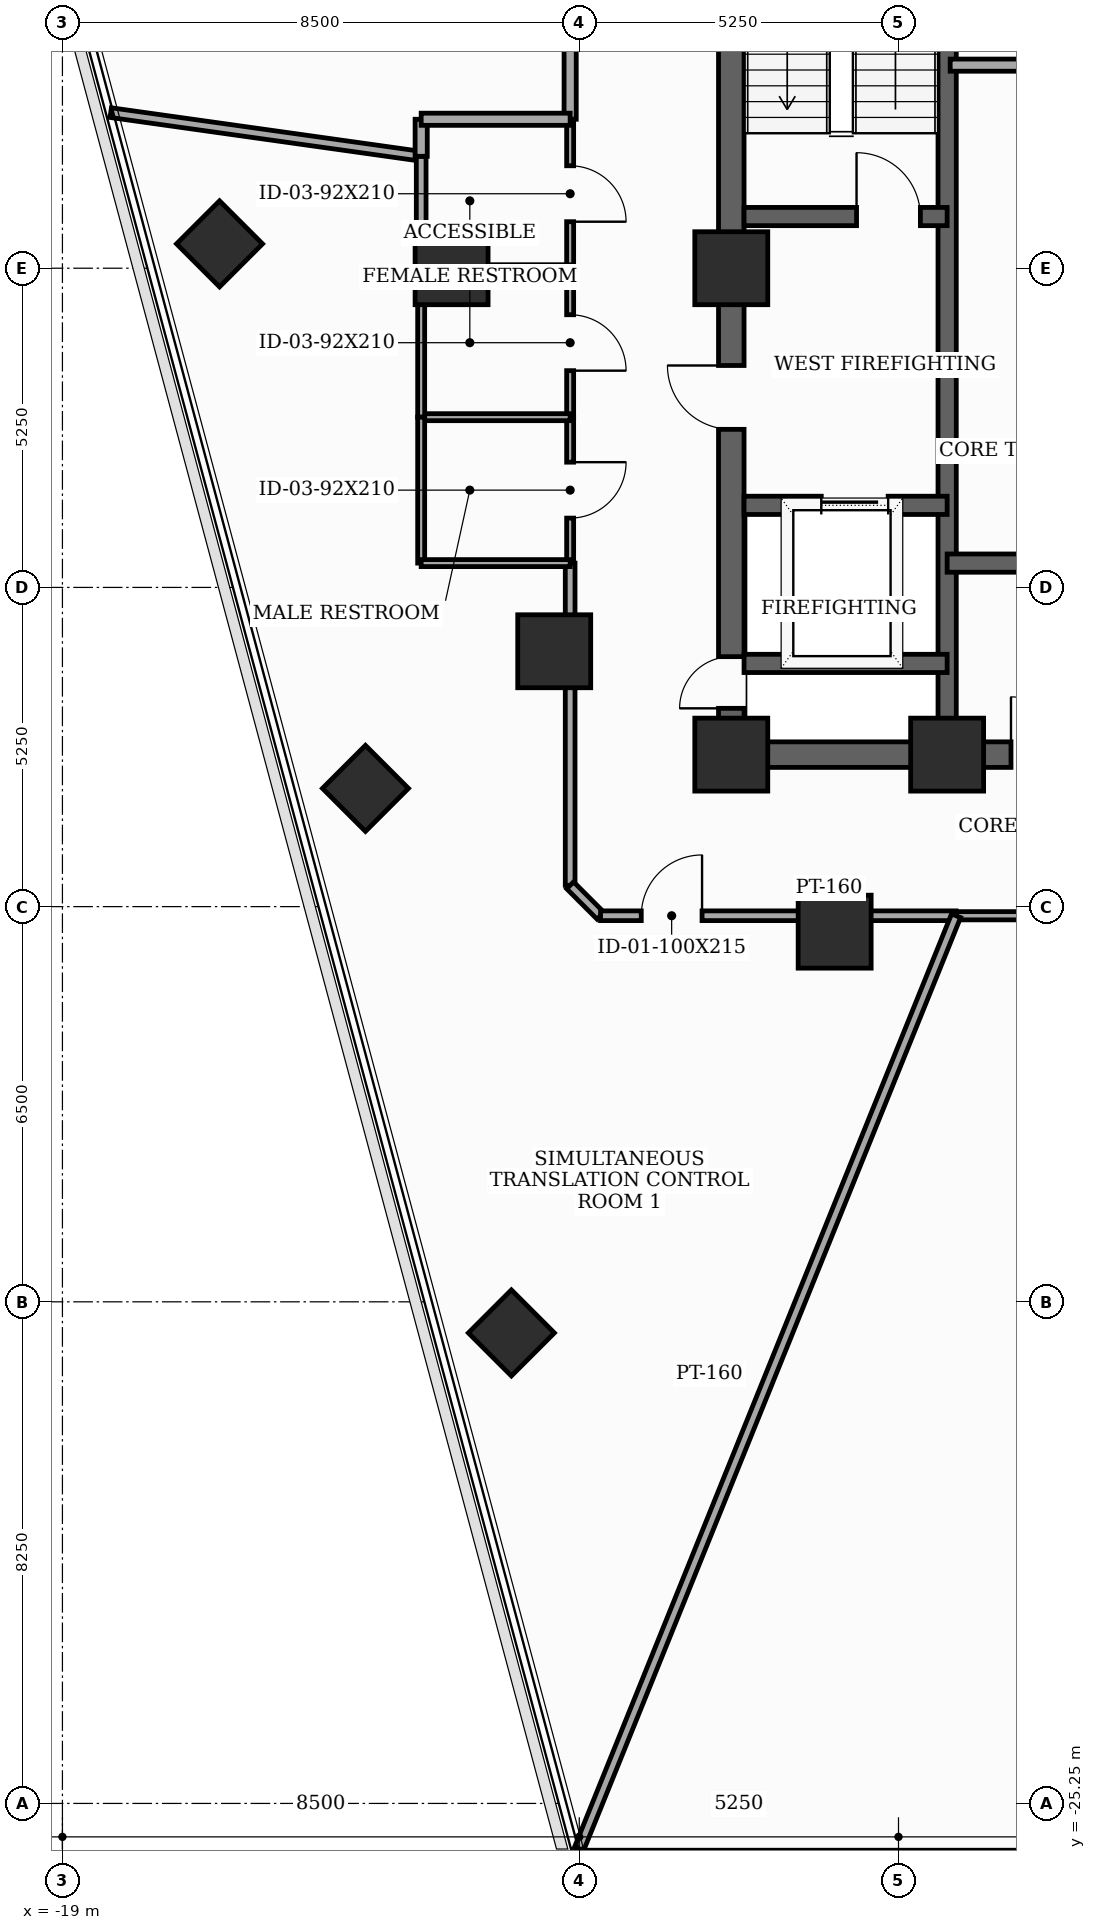
"""IFC4 building model, lengths in metres.
Left out: names, types, materials, properties, quantities, classifications, styles, units other than length and angle.
Written with IfcOpenShell. Run it as: python <this file> out.ifc"""

import sys

from ifc_helpers import new_model, si_unit, direction, frame, frame_2d, origin, origin_2d, place, context, subcontext, project, spatial, rectangle, extrude, element, fill, save


model = new_model("IFC4")
c1 = context("Model", 3, precision=1e-05, world=origin(), true_north=direction((0.0, 1.0)))
c2 = subcontext(c1, "Body", "Model", "MODEL_VIEW")
j1 = project(units=[si_unit("LENGTHUNIT", "METRE"), si_unit("PLANEANGLEUNIT", "RADIAN")], contexts=[c1])
p1 = place(None, origin())
s1 = spatial("IfcSite", under=j1, at=p1, CompositionType="ELEMENT")
p2 = place(p1, origin())
s2 = spatial("IfcBuilding", under=s1, at=p2, CompositionType="ELEMENT")
p3 = place(p2, frame((0.0, 0.0, 202.7)))
s3 = spatial("IfcBuildingStorey", under=s2, at=p3, CompositionType="ELEMENT", Elevation=202.7)
for number, where, z_axis, x_axis in (
    (1, (-8.0, -8.0, 0.0), (0.0, 0.0, 1.0), (1.0, 0.0, 0.0)),
    (2, (-4.45, -8.0, 0.0), (0.0, 0.0, 1.0), (1.0, 0.0, 0.0)),
    (3, (-8.0, 0.0, 0.0), (0.0, 0.0, 1.0), (1.0, 0.0, 0.0)),
    (4, (-12.6, 0.0, 0.0), (0.0, 0.0, 1.0), (1.0, 0.0, 0.0)),
    (5, (-10.912, -6.3, 0.0), (0.0, 0.0, 1.0), (1.0, 0.0, 0.0)),
    (6, (-6.3, -10.912, 0.0), (0.0, 0.0, 1.0), (1.0, 0.0, 0.0)),
):
    element("IfcColumn", number, at=place(p3, frame(where, z_axis=z_axis, x_axis=x_axis)), inside=s3, PredefinedType="COLUMN", context=c2, shape_type="SweptSolid", body=[
        extrude(rectangle(XDim=1.2, YDim=1.2, at=origin_2d()), origin(), (0.0, 0.0, 1.0), 3.7),
    ])
for number, where, z_axis, x_axis in (
    (7, (-16.416, 0.401, 0.0), (0.0, 0.0, 1.0), (0.707, 0.707, 0.0)),
    (8, (-14.016, -8.555, 0.0), (0.0, 0.0, 1.0), (0.707, 0.707, 0.0)),
    (9, (-11.616, -17.511, 0.0), (0.0, 0.0, 1.0), (0.707, 0.707, 0.0)),
):
    element("IfcColumn", number, at=place(p3, frame(where, z_axis=z_axis, x_axis=x_axis)), inside=s3, PredefinedType="COLUMN", context=c2, shape_type="SweptSolid", body=[
        extrude(rectangle(XDim=1.0, YDim=1.0, at=origin_2d()), origin(), (0.0, 0.0, 1.0), 3.7),
    ])
p4 = place(p3, frame((-8.0, -8.0, 0.0), z_axis=(0.0, 0.0, 1.0), x_axis=(0.0, 1.0, 0.0)))
e10 = element("IfcWall", 10, at=p4, inside=s3, PredefinedType="SHEAR", context=c2, shape_type="SweptSolid", body=[
    extrude(rectangle(XDim=16.0, YDim=0.42, at=frame_2d((8.0, 0.0))), origin(), (0.0, 0.0, 1.0), 3.5),
])
p5 = place(p4, frame((0.761, 0.0, 0.0)))
e11 = element("IfcOpeningElement", 11, at=p5, cuts=e10, PredefinedType="OPENING", context=c2, shape_type="SweptSolid", body=[
    extrude(rectangle(XDim=0.85, YDim=2.02, at=frame_2d((0.425, 1.01))), frame((0.0, 0.22, 0.0), z_axis=(0.0, -1.0, 0.0), x_axis=(1.0, 0.0, 0.0)), (0.0, 0.0, 1.0), 0.44),
])
p6 = place(p4, frame((5.35, 0.0, 0.0)))
e12 = element("IfcOpeningElement", 12, at=p6, cuts=e10, PredefinedType="OPENING", context=c2, shape_type="SweptSolid", body=[
    extrude(rectangle(XDim=1.05, YDim=2.15, at=frame_2d((0.525, 1.075))), frame((0.0, 0.22, 0.0), z_axis=(0.0, -1.0, 0.0), x_axis=(1.0, 0.0, 0.0)), (0.0, 0.0, 1.0), 0.44),
])
p7 = place(p3, frame((-8.0, -8.0, 0.0), z_axis=(0.0, 0.0, 1.0), x_axis=(1.0, 0.0, 0.0)))
e13 = element("IfcWall", 13, at=p7, inside=s3, PredefinedType="SHEAR", context=c2, shape_type="SweptSolid", body=[
    extrude(rectangle(XDim=16.0, YDim=0.42, at=frame_2d((8.0, 0.0))), origin(), (0.0, 0.0, 1.0), 3.5),
])
p8 = place(p7, frame((4.6, 0.0, 0.0)))
e14 = element("IfcOpeningElement", 14, at=p8, cuts=e13, PredefinedType="OPENING", context=c2, shape_type="SweptSolid", body=[
    extrude(rectangle(XDim=0.95, YDim=2.1, at=frame_2d((0.475, 1.05))), frame((0.0, 0.22, 0.0), z_axis=(0.0, -1.0, 0.0), x_axis=(1.0, 0.0, 0.0)), (0.0, 0.0, 1.0), 0.44),
])
p9 = place(p7, frame((7.52, 0.0, 0.0)))
e15 = element("IfcOpeningElement", 15, at=p9, cuts=e13, PredefinedType="OPENING", context=c2, shape_type="SweptSolid", body=[
    extrude(rectangle(XDim=0.95, YDim=2.1, at=frame_2d((0.475, 1.05))), frame((0.0, 0.22, 0.0), z_axis=(0.0, -1.0, 0.0), x_axis=(1.0, 0.0, 0.0)), (0.0, 0.0, 1.0), 0.44),
])
p10 = place(p7, frame((10.45, 0.0, 0.0)))
e16 = element("IfcOpeningElement", 16, at=p10, cuts=e13, PredefinedType="OPENING", context=c2, shape_type="SweptSolid", body=[
    extrude(rectangle(XDim=0.95, YDim=2.1, at=frame_2d((0.475, 1.05))), frame((0.0, 0.22, 0.0), z_axis=(0.0, -1.0, 0.0), x_axis=(1.0, 0.0, 0.0)), (0.0, 0.0, 1.0), 0.44),
])
p11 = place(p3, frame((-4.45, -7.79, 0.0), z_axis=(0.0, 0.0, 1.0), x_axis=(0.0, 1.0, 0.0)))
e17 = element("IfcWall", 17, at=p11, inside=s3, PredefinedType="SHEAR", context=c2, shape_type="SweptSolid", body=[
    extrude(rectangle(XDim=15.58, YDim=0.3, at=frame_2d((7.79, 0.0))), origin(), (0.0, 0.0, 1.0), 3.5),
])
p12 = place(p3, frame((-7.79, 0.85, 0.0), z_axis=(0.0, 0.0, 1.0), x_axis=(1.0, 0.0, 0.0)))
e18 = element("IfcWall", 18, at=p12, inside=s3, PredefinedType="SHEAR", context=c2, shape_type="SweptSolid", body=[
    extrude(rectangle(XDim=3.34, YDim=0.3, at=frame_2d((1.67, 0.0))), origin(), (0.0, 0.0, 1.0), 3.5),
])
p13 = place(p12, frame((1.85, 0.0, 0.0)))
e19 = element("IfcOpeningElement", 19, at=p13, cuts=e18, PredefinedType="OPENING", context=c2, shape_type="SweptSolid", body=[
    extrude(rectangle(XDim=1.05, YDim=2.15, at=frame_2d((0.525, 1.075))), frame((0.0, 0.16, 0.0), z_axis=(0.0, -1.0, 0.0), x_axis=(1.0, 0.0, 0.0)), (0.0, 0.0, 1.0), 0.32),
])
p14 = place(p3, frame((-7.79, -3.9, 0.0), z_axis=(0.0, 0.0, 1.0), x_axis=(1.0, 0.0, 0.0)))
e20 = element("IfcWall", 20, at=p14, inside=s3, PredefinedType="SHEAR", context=c2, shape_type="SweptSolid", body=[
    extrude(rectangle(XDim=3.34, YDim=0.3, at=frame_2d((1.67, 0.0))), origin(), (0.0, 0.0, 1.0), 3.5),
])
p15 = place(p14, frame((1.27, 0.0, 0.0)))
e21 = element("IfcOpeningElement", 21, at=p15, cuts=e20, PredefinedType="OPENING", context=c2, shape_type="SweptSolid", body=[
    extrude(rectangle(XDim=1.1, YDim=2.1, at=frame_2d((0.55, 1.05))), frame((0.0, 0.16, 0.0), z_axis=(0.0, -1.0, 0.0), x_axis=(1.0, 0.0, 0.0)), (0.0, 0.0, 1.0), 0.32),
])
p16 = place(p3, frame((-7.79, -6.5, 0.0), z_axis=(0.0, 0.0, 1.0), x_axis=(1.0, 0.0, 0.0)))
e22 = element("IfcWall", 22, at=p16, inside=s3, PredefinedType="SHEAR", context=c2, shape_type="SweptSolid", body=[
    extrude(rectangle(XDim=3.34, YDim=0.3, at=frame_2d((1.67, 0.0))), origin(), (0.0, 0.0, 1.0), 3.5),
])
p17 = place(p3, frame((-4.45, -4.85, 0.0), z_axis=(0.0, 0.0, 1.0), x_axis=(1.0, 0.0, 0.0)))
e23 = element("IfcWall", 23, at=p17, inside=s3, PredefinedType="SHEAR", context=c2, shape_type="SweptSolid", body=[
    extrude(rectangle(XDim=8.9, YDim=0.3, at=frame_2d((4.45, 0.0))), origin(), (0.0, 0.0, 1.0), 3.5),
])
p18 = place(p3, frame((-4.4, 3.34, 0.0), z_axis=(0.0, 0.0, 1.0), x_axis=(1.0, 0.0, 0.0)))
e24 = element("IfcWall", 24, at=p18, inside=s3, PredefinedType="SOLIDWALL", context=c2, shape_type="SweptSolid", body=[
    extrude(rectangle(XDim=2.68, YDim=0.2, at=frame_2d((1.34, 0.0))), origin(), (0.0, 0.0, 1.0), 3.5),
])
p19 = place(p3, frame((-10.65, 0.0, 0.0), z_axis=(0.0, 0.0, 1.0), x_axis=(0.0, -1.0, 0.0)))
e25 = element("IfcWall", 25, at=p19, inside=s3, PredefinedType="PARTITIONING", context=c2, shape_type="SweptSolid", body=[
    extrude(rectangle(XDim=2.45, YDim=0.115, at=frame_2d((1.225, 0.0))), origin(), (0.0, 0.0, 1.0), 2.885),
])
p20 = place(p19, frame((0.765, 0.0, 0.0)))
e26 = element("IfcOpeningElement", 26, at=p20, cuts=e25, PredefinedType="OPENING", context=c2, shape_type="SweptSolid", body=[
    extrude(rectangle(XDim=0.92, YDim=2.1, at=frame_2d((0.46, 1.05))), frame((0.0, 0.067, 0.0), z_axis=(0.0, -1.0, 0.0), x_axis=(1.0, 0.0, 0.0)), (0.0, 0.0, 1.0), 0.135),
])
p21 = place(p3, frame((-10.65, -2.45, 0.0), z_axis=(0.0, 0.0, 1.0), x_axis=(0.0, -1.0, 0.0)))
e27 = element("IfcWall", 27, at=p21, inside=s3, PredefinedType="PARTITIONING", context=c2, shape_type="SweptSolid", body=[
    extrude(rectangle(XDim=2.4, YDim=0.115, at=frame_2d((1.2, 0.0))), origin(), (0.0, 0.0, 1.0), 3.5),
])
p22 = place(p21, frame((0.74, 0.0, 0.0)))
e28 = element("IfcOpeningElement", 28, at=p22, cuts=e27, PredefinedType="OPENING", context=c2, shape_type="SweptSolid", body=[
    extrude(rectangle(XDim=0.92, YDim=2.1, at=frame_2d((0.46, 1.05))), frame((0.0, 0.067, 0.0), z_axis=(0.0, -1.0, 0.0), x_axis=(1.0, 0.0, 0.0)), (0.0, 0.0, 1.0), 0.135),
])
p23 = place(p3, frame((-10.65, -4.85, 0.0), z_axis=(0.0, 0.0, 1.0), x_axis=(0.0, -1.0, 0.0)))
e29 = element("IfcWall", 29, at=p23, inside=s3, PredefinedType="PARTITIONING", context=c2, shape_type="SweptSolid", body=[
    extrude(rectangle(XDim=5.3, YDim=0.16, at=frame_2d((2.65, 0.0))), origin(), (0.0, 0.0, 1.0), 2.885),
])
p24 = place(p3, frame((-10.65, -10.15, 0.0), z_axis=(0.0, 0.0, 1.0), x_axis=(0.707106781187, -0.707106781187, 0.0)))
e30 = element("IfcWall", 30, at=p24, inside=s3, PredefinedType="PARTITIONING", context=c2, shape_type="SweptSolid", body=[
    extrude(rectangle(XDim=0.707, YDim=0.16, at=frame_2d((0.354, 0.0))), origin(), (0.0, 0.0, 1.0), 3.5),
])
p25 = place(p3, frame((-10.15, -10.65, 0.0), z_axis=(0.0, 0.0, 1.0), x_axis=(1.0, 0.0, 0.0)))
e31 = element("IfcWall", 31, at=p25, inside=s3, PredefinedType="PARTITIONING", context=c2, shape_type="SweptSolid", body=[
    extrude(rectangle(XDim=5.847, YDim=0.16, at=frame_2d((2.923, 0.0))), origin(), (0.0, 0.0, 1.0), 2.885),
])
p26 = place(p25, frame((0.669, 0.0, 0.0)))
e32 = element("IfcOpeningElement", 32, at=p26, cuts=e31, PredefinedType="OPENING", context=c2, shape_type="SweptSolid", body=[
    extrude(rectangle(XDim=1.0, YDim=2.15, at=frame_2d((0.5, 1.075))), frame((0.0, 0.09, 0.0), z_axis=(0.0, -1.0, 0.0), x_axis=(1.0, 0.0, 0.0)), (0.0, 0.0, 1.0), 0.18),
])
p27 = place(p3, frame((-4.303, -10.65, 0.0), z_axis=(0.0, 0.0, 1.0), x_axis=(1.0, 0.0, 0.0)))
e33 = element("IfcWall", 33, at=p27, inside=s3, PredefinedType="PARTITIONING", context=c2, shape_type="SweptSolid", body=[
    extrude(rectangle(XDim=14.453, YDim=0.135, at=frame_2d((7.227, 0.0))), origin(), (0.0, 0.0, 1.0), 2.885),
])
p28 = place(p27, frame((6.751, 0.0, 0.0)))
e34 = element("IfcOpeningElement", 34, at=p28, cuts=e33, PredefinedType="OPENING", context=c2, shape_type="SweptSolid", body=[
    extrude(rectangle(XDim=0.95, YDim=2.1, at=frame_2d((0.475, 1.05))), frame((0.0, 0.077, 0.0), z_axis=(0.0, -1.0, 0.0), x_axis=(1.0, 0.0, 0.0)), (0.0, 0.0, 1.0), 0.155),
])
p29 = place(p3, frame((-10.65, 10.15, 0.0), z_axis=(0.0, 0.0, 1.0), x_axis=(0.0, -1.0, 0.0)))
e35 = element("IfcWall", 35, at=p29, inside=s3, PredefinedType="SOLIDWALL", context=c2, shape_type="SweptSolid", body=[
    extrude(rectangle(XDim=7.7, YDim=0.2, at=frame_2d((3.85, 0.0))), origin(), (0.0, 0.0, 1.0), 2.885),
])
p30 = place(p3, frame((-10.65, 2.45, 0.0), z_axis=(0.0, 0.0, 1.0), x_axis=(0.0, -1.0, 0.0)))
e36 = element("IfcWall", 36, at=p30, inside=s3, PredefinedType="PARTITIONING", context=c2, shape_type="SweptSolid", body=[
    extrude(rectangle(XDim=2.45, YDim=0.115, at=frame_2d((1.225, 0.0))), origin(), (0.0, 0.0, 1.0), 2.885),
])
p31 = place(p30, frame((0.765, 0.0, 0.0)))
e37 = element("IfcOpeningElement", 37, at=p31, cuts=e36, PredefinedType="OPENING", context=c2, shape_type="SweptSolid", body=[
    extrude(rectangle(XDim=0.92, YDim=2.1, at=frame_2d((0.46, 1.05))), frame((0.0, 0.067, 0.0), z_axis=(0.0, -1.0, 0.0), x_axis=(1.0, 0.0, 0.0)), (0.0, 0.0, 1.0), 0.135),
])
p32 = place(p3, frame((-13.1, -2.45, 0.0), z_axis=(0.0, 0.0, 1.0), x_axis=(1.0, 0.0, 0.0)))
e38 = element("IfcWall", 38, at=p32, inside=s3, PredefinedType="PARTITIONING", context=c2, shape_type="SweptSolid", body=[
    extrude(rectangle(XDim=2.45, YDim=0.115, at=frame_2d((1.225, 0.0))), origin(), (0.0, 0.0, 1.0), 2.885),
])
p33 = place(p3, frame((-13.1, 0.0, 0.0), z_axis=(0.0, 0.0, 1.0), x_axis=(0.0, -1.0, 0.0)))
e39 = element("IfcWall", 39, at=p33, inside=s3, PredefinedType="PARTITIONING", context=c2, shape_type="SweptSolid", body=[
    extrude(rectangle(XDim=2.45, YDim=0.115, at=frame_2d((1.225, 0.0))), origin(), (0.0, 0.0, 1.0), 2.975),
])
p34 = place(p3, frame((-10.65, 0.0, 0.0), z_axis=(0.0, 0.0, 1.0), x_axis=(-1.0, 0.0, 0.0)))
e40 = element("IfcWall", 40, at=p34, inside=s3, PredefinedType="PARTITIONING", context=c2, shape_type="SweptSolid", body=[
    extrude(rectangle(XDim=2.45, YDim=0.115, at=frame_2d((1.225, 0.0))), origin(), (0.0, 0.0, 1.0), 2.885),
])
p35 = place(p3, frame((-13.1, -2.45, 0.0), z_axis=(0.0, 0.0, 1.0), x_axis=(0.0, -1.0, 0.0)))
e41 = element("IfcWall", 41, at=p35, inside=s3, PredefinedType="PARTITIONING", context=c2, shape_type="SweptSolid", body=[
    extrude(rectangle(XDim=2.4, YDim=0.115, at=frame_2d((1.2, 0.0))), origin(), (0.0, 0.0, 1.0), 3.5),
])
p36 = place(p3, frame((-13.1, -4.85, 0.0), z_axis=(0.0, 0.0, 1.0), x_axis=(1.0, 0.0, 0.0)))
e42 = element("IfcWall", 42, at=p36, inside=s3, PredefinedType="PARTITIONING", context=c2, shape_type="SweptSolid", body=[
    extrude(rectangle(XDim=2.45, YDim=0.115, at=frame_2d((1.225, 0.0))), origin(), (0.0, 0.0, 1.0), 2.885),
])
p37 = place(p3, frame((-10.534, -26.073, 0.0), z_axis=(0.0, 0.0, 1.0), x_axis=(0.374584629334, 0.927192728329, 0.0)))
e43 = element("IfcWall", 43, at=p37, inside=s3, PredefinedType="PARTITIONING", context=c2, shape_type="SweptSolid", body=[
    extrude(rectangle(XDim=16.634, YDim=0.16, at=frame_2d((8.317, 0.0))), origin(), (0.0, 0.0, 1.0), 2.885),
])
p38 = place(p3, frame((-13.1, 1.841, 0.0), z_axis=(0.0, 0.0, 1.0), x_axis=(-0.990254946284, 0.139266440179, 0.0)))
e44 = element("IfcWall", 44, at=p38, inside=s3, PredefinedType="PARTITIONING", context=c2, shape_type="SweptSolid", body=[
    extrude(rectangle(XDim=5.156, YDim=0.16, at=frame_2d((2.578, 0.0))), origin(), (0.0, 0.0, 1.0), 2.975),
])
p39 = place(p3, frame((-13.1, 0.0, 0.0), z_axis=(0.0, 0.0, 1.0), x_axis=(0.0, 1.0, 0.0)))
e45 = element("IfcWall", 45, at=p39, inside=s3, PredefinedType="PARTITIONING", context=c2, shape_type="SweptSolid", body=[
    extrude(rectangle(XDim=1.841, YDim=0.16, at=frame_2d((0.92, 0.0))), origin(), (0.0, 0.0, 1.0), 2.975),
])
p40 = place(p3, frame((-13.1, 1.841, 0.0), z_axis=(0.0, 0.0, 1.0), x_axis=(0.0, 1.0, 0.0)))
e46 = element("IfcWall", 46, at=p40, inside=s3, PredefinedType="SOLIDWALL", context=c2, shape_type="SweptSolid", body=[
    extrude(rectangle(XDim=0.609, YDim=0.2, at=frame_2d((0.304, 0.0))), origin(), (0.0, 0.0, 1.0), 3.5),
])
p41 = place(p3, frame((-13.1, 2.45, 0.0), z_axis=(0.0, 0.0, 1.0), x_axis=(1.0, 0.0, 0.0)))
e47 = element("IfcWall", 47, at=p41, inside=s3, PredefinedType="SOLIDWALL", context=c2, shape_type="SweptSolid", body=[
    extrude(rectangle(XDim=2.45, YDim=0.2, at=frame_2d((1.225, 0.0))), origin(), (0.0, 0.0, 1.0), 2.885),
])
p42 = place(p5, origin())
e48 = element("IfcDoor", 48, at=p42, inside=s3, OperationType="SINGLE_SWING_LEFT", PredefinedType="TRAPDOOR", context=c2, shape_type="SweptSolid", body=[
    extrude(rectangle(XDim=0.85, YDim=2.02, at=frame_2d((0.425, 1.01))), frame((0.0, 0.025, 0.0), z_axis=(0.0, -1.0, 0.0), x_axis=(1.0, 0.0, 0.0)), (0.0, 0.0, 1.0), 0.05),
])
fill(e11, e48)
p43 = place(p6, origin())
e49 = element("IfcDoor", 49, at=p43, inside=s3, OperationType="SINGLE_SWING_RIGHT", PredefinedType="DOOR", context=c2, shape_type="SweptSolid", body=[
    extrude(rectangle(XDim=1.05, YDim=2.15, at=frame_2d((0.525, 1.075))), frame((0.0, 0.025, 0.0), z_axis=(0.0, -1.0, 0.0), x_axis=(1.0, 0.0, 0.0)), (0.0, 0.0, 1.0), 0.05),
])
fill(e12, e49)
p44 = place(p8, origin())
e50 = element("IfcDoor", 50, at=p44, inside=s3, OperationType="SINGLE_SWING_LEFT", PredefinedType="DOOR", context=c2, shape_type="SweptSolid", body=[
    extrude(rectangle(XDim=0.95, YDim=2.1, at=frame_2d((0.475, 1.05))), frame((0.0, 0.025, 0.0), z_axis=(0.0, -1.0, 0.0), x_axis=(1.0, 0.0, 0.0)), (0.0, 0.0, 1.0), 0.05),
])
fill(e14, e50)
p45 = place(p13, origin())
e51 = element("IfcDoor", 51, at=p45, inside=s3, OperationType="SINGLE_SWING_LEFT", PredefinedType="DOOR", context=c2, shape_type="SweptSolid", body=[
    extrude(rectangle(XDim=1.05, YDim=2.15, at=frame_2d((0.525, 1.075))), frame((0.0, 0.025, 0.0), z_axis=(0.0, -1.0, 0.0), x_axis=(1.0, 0.0, 0.0)), (0.0, 0.0, 1.0), 0.05),
])
fill(e19, e51)
p46 = place(p15, origin())
e52 = element("IfcDoor", 52, at=p46, inside=s3, OperationType="SLIDING_TO_LEFT", PredefinedType="DOOR", context=c2, shape_type="SweptSolid", body=[
    extrude(rectangle(XDim=1.1, YDim=2.1, at=frame_2d((0.55, 1.05))), frame((0.0, 0.025, 0.0), z_axis=(0.0, -1.0, 0.0), x_axis=(1.0, 0.0, 0.0)), (0.0, 0.0, 1.0), 0.05),
])
fill(e21, e52)
p47 = place(p20, origin())
e53 = element("IfcDoor", 53, at=p47, inside=s3, OperationType="SINGLE_SWING_RIGHT", PredefinedType="DOOR", context=c2, shape_type="SweptSolid", body=[
    extrude(rectangle(XDim=0.92, YDim=2.1, at=frame_2d((0.46, 1.05))), frame((0.0, 0.025, 0.0), z_axis=(0.0, -1.0, 0.0), x_axis=(1.0, 0.0, 0.0)), (0.0, 0.0, 1.0), 0.05),
])
fill(e26, e53)
p48 = place(p22, origin())
e54 = element("IfcDoor", 54, at=p48, inside=s3, OperationType="SINGLE_SWING_LEFT", PredefinedType="DOOR", context=c2, shape_type="SweptSolid", body=[
    extrude(rectangle(XDim=0.92, YDim=2.1, at=frame_2d((0.46, 1.05))), frame((0.0, 0.025, 0.0), z_axis=(0.0, -1.0, 0.0), x_axis=(1.0, 0.0, 0.0)), (0.0, 0.0, 1.0), 0.05),
])
fill(e28, e54)
p49 = place(p26, origin())
e55 = element("IfcDoor", 55, at=p49, inside=s3, OperationType="SINGLE_SWING_RIGHT", PredefinedType="DOOR", context=c2, shape_type="SweptSolid", body=[
    extrude(rectangle(XDim=1.0, YDim=2.15, at=frame_2d((0.5, 1.075))), frame((0.0, 0.025, 0.0), z_axis=(0.0, -1.0, 0.0), x_axis=(1.0, 0.0, 0.0)), (0.0, 0.0, 1.0), 0.05),
])
fill(e32, e55)
p50 = place(p31, origin())
e56 = element("IfcDoor", 56, at=p50, inside=s3, OperationType="SINGLE_SWING_RIGHT", PredefinedType="DOOR", context=c2, shape_type="SweptSolid", body=[
    extrude(rectangle(XDim=0.92, YDim=2.1, at=frame_2d((0.46, 1.05))), frame((0.0, 0.025, 0.0), z_axis=(0.0, -1.0, 0.0), x_axis=(1.0, 0.0, 0.0)), (0.0, 0.0, 1.0), 0.05),
])
fill(e37, e56)
save(model, sys.argv[1])
